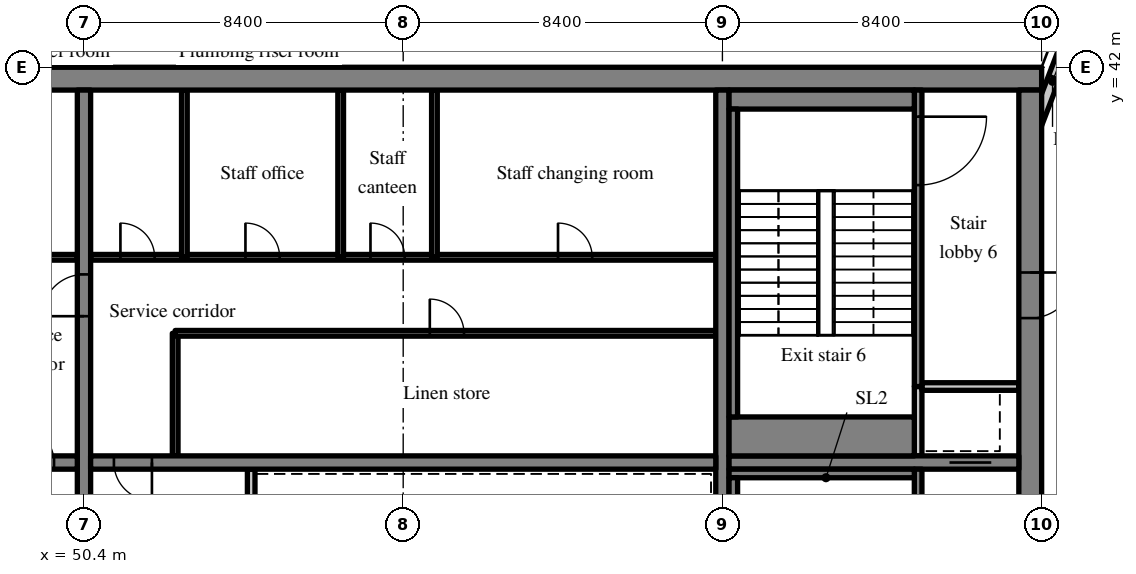
"""IFC4 building model, lengths in metres.
Left out: names, types, materials, properties, quantities, classifications, styles, units other than length and angle.
Written with IfcOpenShell. Run it as: python <this file> out.ifc"""

import sys

from ifc_helpers import new_model, si_unit, direction, frame, frame_2d, origin, place, context, subcontext, project, spatial, rectangle, extrude, source, transform, mapped, element, fill, save


model = new_model("IFC4")
c1 = context("Model", 3, precision=1e-05, world=origin(), true_north=direction((0.0, 1.0)))
c2 = subcontext(c1, "Body", "Model", "MODEL_VIEW")
j1 = project(units=[si_unit("LENGTHUNIT", "METRE"), si_unit("PLANEANGLEUNIT", "RADIAN")], contexts=[c1])
p1 = place(None, origin())
s1 = spatial("IfcSite", under=j1, at=p1, CompositionType="ELEMENT")
p2 = place(p1, origin())
s2 = spatial("IfcBuilding", under=s1, at=p2, CompositionType="ELEMENT")
p3 = place(p2, frame((0.0, 0.0, 225.7)))
s3 = spatial("IfcBuildingStorey", under=s2, at=p3, CompositionType="ELEMENT", Elevation=225.7)
m1 = source(origin(), c2, "Body", "SweptSolid", [
    extrude(rectangle(XDim=50.4, YDim=0.6, at=frame_2d((25.2, 0.0))), origin(), (0.0, 0.0, 1.0), 3.62),
])
p4 = place(p3, frame((25.2, 41.7, 0.0), z_axis=(0.0, 0.0, 1.0), x_axis=(1.0, 0.0, 0.0)))
e1 = element("IfcWall", 1, at=p4, inside=s3, PredefinedType="SHEAR", context=c2, shape_type="MappedRepresentation", body=[
    mapped(m1, transform((0.0, 0.0, 0.0), scale=1.0)),
])
m2 = source(origin(), c2, "Body", "SweptSolid", [
    extrude(rectangle(XDim=18.8, YDim=0.6, at=frame_2d((9.4, 0.0))), origin(), (0.0, 0.0, 1.0), 3.62),
])
p5 = place(p3, frame((75.3, 22.6, 0.0), z_axis=(0.0, 0.0, 1.0), x_axis=(0.0, 1.0, 0.0)))
e2 = element("IfcWall", 2, at=p5, inside=s3, PredefinedType="SHEAR", context=c2, shape_type="MappedRepresentation", body=[
    mapped(m2, transform((0.0, 0.0, 0.0), scale=1.0)),
])
m3 = source(origin(), c2, "Body", "SweptSolid", [
    extrude(rectangle(XDim=1.2, YDim=2.1, at=frame_2d((0.6, 1.05))), frame((0.0, 0.31, 0.0), z_axis=(0.0, -1.0, 0.0), x_axis=(1.0, 0.0, 0.0)), (0.0, 0.0, 1.0), 0.62),
])
p6 = place(p5, frame((12.8, 0.0, 0.0)))
e3 = element("IfcOpeningElement", 3, at=p6, cuts=e2, PredefinedType="OPENING", context=c2, shape_type="MappedRepresentation", body=[
    mapped(m3, transform((0.0, 0.0, 0.0), scale=1.0)),
])
m4 = source(origin(), c2, "Body", "SweptSolid", [
    extrude(rectangle(XDim=18.8, YDim=0.35, at=frame_2d((9.4, 0.0))), origin(), (0.0, 0.0, 1.0), 3.62),
])
p7 = place(p3, frame((50.4, 22.6, 0.0), z_axis=(0.0, 0.0, 1.0), x_axis=(0.0, 1.0, 0.0)))
e4 = element("IfcWall", 4, at=p7, inside=s3, PredefinedType="SHEAR", context=c2, shape_type="MappedRepresentation", body=[
    mapped(m4, transform((0.0, 0.0, 0.0), scale=1.0)),
])
m5 = source(origin(), c2, "Body", "SweptSolid", [
    extrude(rectangle(XDim=1.1, YDim=2.1, at=frame_2d((0.55, 1.05))), frame((0.0, 0.185, 0.0), z_axis=(0.0, -1.0, 0.0), x_axis=(1.0, 0.0, 0.0)), (0.0, 0.0, 1.0), 0.37),
])
p8 = place(p7, frame((12.85, 0.0, 0.0)))
e5 = element("IfcOpeningElement", 5, at=p8, cuts=e4, PredefinedType="OPENING", context=c2, shape_type="MappedRepresentation", body=[
    mapped(m5, transform((0.0, 0.0, 0.0), scale=1.0)),
])
p9 = place(p3, frame((67.2, 22.6, 0.0), z_axis=(0.0, 0.0, 1.0), x_axis=(0.0, 1.0, 0.0)))
e6 = element("IfcWall", 6, at=p9, inside=s3, PredefinedType="SHEAR", context=c2, shape_type="MappedRepresentation", body=[
    mapped(m4, transform((0.0, 0.0, 0.0), scale=1.0)),
])
m6 = source(origin(), c2, "Body", "SweptSolid", [
    extrude(rectangle(XDim=16.45, YDim=0.35, at=frame_2d((8.225, 0.0))), origin(), (0.0, 0.0, 1.0), 3.62),
])
p10 = place(p3, frame((33.775, 31.6, 0.0), z_axis=(0.0, 0.0, 1.0), x_axis=(1.0, 0.0, 0.0)))
e7 = element("IfcWall", 7, at=p10, inside=s3, PredefinedType="SHEAR", context=c2, shape_type="MappedRepresentation", body=[
    mapped(m6, transform((0.0, 0.0, 0.0), scale=1.0)),
])
m7 = source(origin(), c2, "Body", "SweptSolid", [
    extrude(rectangle(XDim=1.0, YDim=2.1, at=frame_2d((0.5, 1.05))), frame((0.0, 0.185, 0.0), z_axis=(0.0, -1.0, 0.0), x_axis=(1.0, 0.0, 0.0)), (0.0, 0.0, 1.0), 0.37),
])
p11 = place(p10, frame((14.837, 0.0, 0.0)))
e8 = element("IfcOpeningElement", 8, at=p11, cuts=e7, PredefinedType="OPENING", context=c2, shape_type="MappedRepresentation", body=[
    mapped(m7, transform((0.0, 0.0, 0.0), scale=1.0)),
])
m8 = source(origin(), c2, "Body", "SweptSolid", [
    extrude(rectangle(XDim=16.45, YDim=0.35, at=frame_2d((8.225, 0.0))), origin(), (0.0, 0.0, 1.0), 3.62),
])
p12 = place(p3, frame((50.575, 31.6, 0.0), z_axis=(0.0, 0.0, 1.0), x_axis=(1.0, 0.0, 0.0)))
e9 = element("IfcWall", 9, at=p12, inside=s3, PredefinedType="SHEAR", context=c2, shape_type="MappedRepresentation", body=[
    mapped(m8, transform((0.0, 0.0, 0.0), scale=1.0)),
])
p13 = place(p12, frame((0.613, 0.0, 0.0)))
e10 = element("IfcOpeningElement", 10, at=p13, cuts=e9, PredefinedType="OPENING", context=c2, shape_type="MappedRepresentation", body=[
    mapped(m7, transform((0.0, 0.0, 0.0), scale=1.0)),
])
m9 = source(origin(), c2, "Body", "SweptSolid", [
    extrude(rectangle(XDim=7.625, YDim=0.35, at=frame_2d((3.812, 0.0))), origin(), (0.0, 0.0, 1.0), 3.62),
])
p14 = place(p3, frame((67.375, 31.6, 0.0), z_axis=(0.0, 0.0, 1.0), x_axis=(1.0, 0.0, 0.0)))
e11 = element("IfcWall", 11, at=p14, inside=s3, PredefinedType="SHEAR", context=c2, shape_type="MappedRepresentation", body=[
    mapped(m9, transform((0.0, 0.0, 0.0), scale=1.0)),
])
p15 = place(p14, frame((5.8, 0.0, 0.0)))
e12 = element("IfcOpeningElement", 12, at=p15, cuts=e11, PredefinedType="OPENING", context=c2, shape_type="MappedRepresentation", body=[
    mapped(m5, transform((0.0, 0.0, 0.0), scale=1.0)),
])
m10 = source(origin(), c2, "Body", "SweptSolid", [
    extrude(rectangle(XDim=3.559, YDim=0.3, at=frame_2d((1.78, 0.0))), origin(), (0.0, 0.0, 1.0), 3.62),
])
p16 = place(p3, frame((76.523, 43.292, 0.0), z_axis=(0.0, 0.0, 1.0), x_axis=(-0.35779745313, -0.933799219604, 0.0)))
e13 = element("IfcWall", 13, at=p16, inside=s3, PredefinedType="SOLIDWALL", context=c2, shape_type="MappedRepresentation", body=[
    mapped(m10, transform((0.0, 0.0, 0.0), scale=1.0)),
])
m11 = source(origin(), c2, "Body", "SweptSolid", [
    extrude(rectangle(XDim=1.5, YDim=2.0, at=frame_2d((0.75, 1.0))), frame((0.0, 0.16, 0.0), z_axis=(0.0, -1.0, 0.0), x_axis=(1.0, 0.0, 0.0)), (0.0, 0.0, 1.0), 0.32),
])
p17 = place(p16, frame((0.156, 0.0, 0.9)))
e14 = element("IfcOpeningElement", 14, at=p17, cuts=e13, PredefinedType="OPENING", context=c2, shape_type="MappedRepresentation", body=[
    mapped(m11, transform((0.0, 0.0, 0.0), scale=1.0)),
])
m12 = source(origin(), c2, "Body", "SweptSolid", [
    extrude(rectangle(XDim=16.45, YDim=0.15, at=frame_2d((8.225, 0.0))), origin(), (0.0, 0.0, 1.0), 3.62),
])
p18 = place(p3, frame((33.775, 37.0, 0.0), z_axis=(0.0, 0.0, 1.0), x_axis=(1.0, 0.0, 0.0)))
e15 = element("IfcWall", 15, at=p18, inside=s3, PredefinedType="PARTITIONING", context=c2, shape_type="MappedRepresentation", body=[
    mapped(m12, transform((0.0, 0.0, 0.0), scale=1.0)),
])
m13 = source(origin(), c2, "Body", "SweptSolid", [
    extrude(rectangle(XDim=0.9, YDim=2.1, at=frame_2d((0.45, 1.05))), frame((0.0, 0.085, 0.0), z_axis=(0.0, -1.0, 0.0), x_axis=(1.0, 0.0, 0.0)), (0.0, 0.0, 1.0), 0.17),
])
p19 = place(p18, frame((1.606, 0.0, 0.0)))
e16 = element("IfcOpeningElement", 16, at=p19, cuts=e15, PredefinedType="OPENING", context=c2, shape_type="MappedRepresentation", body=[
    mapped(m13, transform((0.0, 0.0, 0.0), scale=1.0)),
])
p20 = place(p18, frame((7.364, 0.0, 0.0)))
e17 = element("IfcOpeningElement", 17, at=p20, cuts=e15, PredefinedType="OPENING", context=c2, shape_type="MappedRepresentation", body=[
    mapped(m13, transform((0.0, 0.0, 0.0), scale=1.0)),
])
p21 = place(p18, frame((12.299, 0.0, 0.0)))
e18 = element("IfcOpeningElement", 18, at=p21, cuts=e15, PredefinedType="OPENING", context=c2, shape_type="MappedRepresentation", body=[
    mapped(m13, transform((0.0, 0.0, 0.0), scale=1.0)),
])
p22 = place(p18, frame((14.766, 0.0, 0.0)))
e19 = element("IfcOpeningElement", 19, at=p22, cuts=e15, PredefinedType="OPENING", context=c2, shape_type="MappedRepresentation", body=[
    mapped(m13, transform((0.0, 0.0, 0.0), scale=1.0)),
])
m14 = source(origin(), c2, "Body", "SweptSolid", [
    extrude(rectangle(XDim=2.625, YDim=0.2, at=frame_2d((1.312, 0.0))), origin(), (0.0, 0.0, 1.0), 3.62),
])
p23 = place(p3, frame((54.8, 28.8, 0.0), z_axis=(0.0, 0.0, 1.0), x_axis=(0.0, 1.0, 0.0)))
e20 = element("IfcWall", 20, at=p23, inside=s3, PredefinedType="SOLIDWALL", context=c2, shape_type="MappedRepresentation", body=[
    mapped(m14, transform((0.0, 0.0, 0.0), scale=1.0)),
])
m15 = source(origin(), c2, "Body", "SweptSolid", [
    extrude(rectangle(XDim=3.225, YDim=0.15, at=frame_2d((1.613, 0.0))), origin(), (0.0, 0.0, 1.0), 3.62),
])
p24 = place(p3, frame((52.8, 31.775, 0.0), z_axis=(0.0, 0.0, 1.0), x_axis=(0.0, 1.0, 0.0)))
e21 = element("IfcWall", 21, at=p24, inside=s3, PredefinedType="PARTITIONING", context=c2, shape_type="MappedRepresentation", body=[
    mapped(m15, transform((0.0, 0.0, 0.0), scale=1.0)),
])
m16 = source(origin(), c2, "Body", "SweptSolid", [
    extrude(rectangle(XDim=14.225, YDim=0.15, at=frame_2d((7.112, 0.0))), origin(), (0.0, 0.0, 1.0), 3.62),
])
p25 = place(p3, frame((67.025, 35.0, 0.0), z_axis=(0.0, 0.0, 1.0), x_axis=(-1.0, 0.0, 0.0)))
e22 = element("IfcWall", 22, at=p25, inside=s3, PredefinedType="PARTITIONING", context=c2, shape_type="MappedRepresentation", body=[
    mapped(m16, transform((0.0, 0.0, 0.0), scale=1.0)),
])
p26 = place(p25, frame((6.625, 0.0, 0.0)))
e23 = element("IfcOpeningElement", 23, at=p26, cuts=e22, PredefinedType="OPENING", context=c2, shape_type="MappedRepresentation", body=[
    mapped(m13, transform((0.0, 0.0, 0.0), scale=1.0)),
])
m17 = source(origin(), c2, "Body", "SweptSolid", [
    extrude(rectangle(XDim=16.45, YDim=0.15, at=frame_2d((8.225, 0.0))), origin(), (0.0, 0.0, 1.0), 3.62),
])
p27 = place(p3, frame((67.025, 37.0, 0.0), z_axis=(0.0, 0.0, 1.0), x_axis=(-1.0, 0.0, 0.0)))
e24 = element("IfcWall", 24, at=p27, inside=s3, PredefinedType="PARTITIONING", context=c2, shape_type="MappedRepresentation", body=[
    mapped(m17, transform((0.0, 0.0, 0.0), scale=1.0)),
])
p28 = place(p27, frame((3.251, 0.0, 0.0)))
e25 = element("IfcOpeningElement", 25, at=p28, cuts=e24, PredefinedType="OPENING", context=c2, shape_type="MappedRepresentation", body=[
    mapped(m13, transform((0.0, 0.0, 0.0), scale=1.0)),
])
p29 = place(p27, frame((8.186, 0.0, 0.0)))
e26 = element("IfcOpeningElement", 26, at=p29, cuts=e24, PredefinedType="OPENING", context=c2, shape_type="MappedRepresentation", body=[
    mapped(m13, transform((0.0, 0.0, 0.0), scale=1.0)),
])
p30 = place(p27, frame((11.476, 0.0, 0.0)))
e27 = element("IfcOpeningElement", 27, at=p30, cuts=e24, PredefinedType="OPENING", context=c2, shape_type="MappedRepresentation", body=[
    mapped(m13, transform((0.0, 0.0, 0.0), scale=1.0)),
])
p31 = place(p27, frame((14.766, 0.0, 0.0)))
e28 = element("IfcOpeningElement", 28, at=p31, cuts=e24, PredefinedType="OPENING", context=c2, shape_type="MappedRepresentation", body=[
    mapped(m13, transform((0.0, 0.0, 0.0), scale=1.0)),
])
m18 = source(origin(), c2, "Body", "SweptSolid", [
    extrude(rectangle(XDim=4.4, YDim=0.15, at=frame_2d((2.2, 0.0))), origin(), (0.0, 0.0, 1.0), 3.62),
])
for number, where, z_axis, x_axis in (
    (29, (59.622, 37.0, 0.0), (0.0, 0.0, 1.0), (0.0, 1.0, 0.0)),
    (30, (57.155, 37.0, 0.0), (0.0, 0.0, 1.0), (0.0, 1.0, 0.0)),
    (31, (53.042, 37.0, 0.0), (0.0, 0.0, 1.0), (0.0, 1.0, 0.0)),
):
    element("IfcWall", number, at=place(p3, frame(where, z_axis=z_axis, x_axis=x_axis)), inside=s3, PredefinedType="PARTITIONING", context=c2, shape_type="MappedRepresentation", body=[
        mapped(m18, transform((0.0, 0.0, 0.0), scale=1.0)),
    ])
m19 = source(origin(), c2, "Body", "SweptSolid", [
    extrude(rectangle(XDim=8.825, YDim=0.2, at=frame_2d((4.413, 0.0))), origin(), (0.0, 0.0, 1.0), 3.62),
])
p32 = place(p3, frame((72.35, 22.6, 0.0), z_axis=(0.0, 0.0, 1.0), x_axis=(0.0, 1.0, 0.0)))
e32 = element("IfcWall", 32, at=p32, inside=s3, PredefinedType="SOLIDWALL", context=c2, shape_type="MappedRepresentation", body=[
    mapped(m19, transform((0.0, 0.0, 0.0), scale=1.0)),
])
m20 = source(origin(), c2, "Body", "SweptSolid", [
    extrude(rectangle(XDim=1.2, YDim=2.1, at=frame_2d((0.6, 1.05))), frame((0.0, 0.11, 0.0), z_axis=(0.0, -1.0, 0.0), x_axis=(1.0, 0.0, 0.0)), (0.0, 0.0, 1.0), 0.22),
])
p33 = place(p32, frame((6.9, 0.0, 0.0)))
e33 = element("IfcOpeningElement", 33, at=p33, cuts=e32, PredefinedType="OPENING", context=c2, shape_type="MappedRepresentation", body=[
    mapped(m20, transform((0.0, 0.0, 0.0), scale=1.0)),
])
m21 = source(origin(), c2, "Body", "SweptSolid", [
    extrude(rectangle(XDim=1.825, YDim=0.2, at=frame_2d((0.913, 0.0))), origin(), (0.0, 0.0, 1.0), 3.62),
])
p34 = place(p3, frame((72.35, 31.775, 0.0), z_axis=(0.0, 0.0, 1.0), x_axis=(0.0, 1.0, 0.0)))
e34 = element("IfcWall", 34, at=p34, inside=s3, PredefinedType="SOLIDWALL", context=c2, shape_type="MappedRepresentation", body=[
    mapped(m21, transform((0.0, 0.0, 0.0), scale=1.0)),
])
m22 = source(origin(), c2, "Body", "SweptSolid", [
    extrude(rectangle(XDim=2.55, YDim=0.2, at=frame_2d((1.275, 0.0))), origin(), (0.0, 0.0, 1.0), 3.62),
])
p35 = place(p3, frame((72.45, 33.6, 0.0), z_axis=(0.0, 0.0, 1.0), x_axis=(1.0, 0.0, 0.0)))
e35 = element("IfcWall", 35, at=p35, inside=s3, PredefinedType="SOLIDWALL", context=c2, shape_type="MappedRepresentation", body=[
    mapped(m22, transform((0.0, 0.0, 0.0), scale=1.0)),
])
m23 = source(origin(), c2, "Body", "SweptSolid", [
    extrude(rectangle(XDim=7.8, YDim=0.2, at=frame_2d((3.9, 0.0))), origin(), (0.0, 0.0, 1.0), 3.62),
])
p36 = place(p3, frame((72.35, 33.6, 0.0), z_axis=(0.0, 0.0, 1.0), x_axis=(0.0, 1.0, 0.0)))
e36 = element("IfcWall", 36, at=p36, inside=s3, PredefinedType="SOLIDWALL", context=c2, shape_type="MappedRepresentation", body=[
    mapped(m23, transform((0.0, 0.0, 0.0), scale=1.0)),
])
m24 = source(origin(), c2, "Body", "SweptSolid", [
    extrude(rectangle(XDim=1.8, YDim=2.1, at=frame_2d((0.9, 1.05))), frame((0.0, 0.11, 0.0), z_axis=(0.0, -1.0, 0.0), x_axis=(1.0, 0.0, 0.0)), (0.0, 0.0, 1.0), 0.22),
])
p37 = place(p36, frame((5.3, 0.0, 0.0)))
e37 = element("IfcOpeningElement", 37, at=p37, cuts=e36, PredefinedType="OPENING", context=c2, shape_type="MappedRepresentation", body=[
    mapped(m24, transform((0.0, 0.0, 0.0), scale=1.0)),
])
m25 = source(origin(), c2, "Body", "SweptSolid", [
    extrude(rectangle(XDim=4.875, YDim=0.225, at=frame_2d((2.438, 0.0))), origin(), (0.0, 0.0, 1.0), 3.62),
])
p38 = place(p3, frame((67.375, 31.312, 0.0), z_axis=(0.0, 0.0, 1.0), x_axis=(1.0, 0.0, 0.0)))
e38 = element("IfcWall", 38, at=p38, inside=s3, PredefinedType="SOLIDWALL", context=c2, shape_type="MappedRepresentation", body=[
    mapped(m25, transform((0.0, 0.0, 0.0), scale=1.0)),
])
m26 = source(origin(), c2, "Body", "SweptSolid", [
    extrude(rectangle(XDim=8.1, YDim=0.225, at=frame_2d((4.05, 0.0))), origin(), (0.0, 0.0, 1.0), 3.62),
])
p39 = place(p3, frame((67.487, 23.1, 0.0), z_axis=(0.0, 0.0, 1.0), x_axis=(0.0, 1.0, 0.0)))
e39 = element("IfcWall", 39, at=p39, inside=s3, PredefinedType="SOLIDWALL", context=c2, shape_type="MappedRepresentation", body=[
    mapped(m26, transform((0.0, 0.0, 0.0), scale=1.0)),
])
m27 = source(origin(), c2, "Body", "SweptSolid", [
    extrude(rectangle(XDim=4.875, YDim=0.5, at=frame_2d((2.438, 0.0))), origin(), (0.0, 0.0, 1.0), 3.62),
])
p40 = place(p3, frame((67.375, 41.15, 0.0), z_axis=(0.0, 0.0, 1.0), x_axis=(1.0, 0.0, 0.0)))
e40 = element("IfcWall", 40, at=p40, inside=s3, PredefinedType="SOLIDWALL", context=c2, shape_type="MappedRepresentation", body=[
    mapped(m27, transform((0.0, 0.0, 0.0), scale=1.0)),
])
m28 = source(origin(), c2, "Body", "SweptSolid", [
    extrude(rectangle(XDim=4.875, YDim=1.025, at=frame_2d((2.438, 0.0))), origin(), (0.0, 0.0, 1.0), 3.62),
])
p41 = place(p3, frame((67.375, 32.287, 0.0), z_axis=(0.0, 0.0, 1.0), x_axis=(1.0, 0.0, 0.0)))
e41 = element("IfcWall", 41, at=p41, inside=s3, PredefinedType="SOLIDWALL", context=c2, shape_type="MappedRepresentation", body=[
    mapped(m28, transform((0.0, 0.0, 0.0), scale=1.0)),
])
p42 = place(p3, frame((67.487, 32.8, 0.0), z_axis=(0.0, 0.0, 1.0), x_axis=(0.0, 1.0, 0.0)))
e42 = element("IfcWall", 42, at=p42, inside=s3, PredefinedType="SOLIDWALL", context=c2, shape_type="MappedRepresentation", body=[
    mapped(m26, transform((0.0, 0.0, 0.0), scale=1.0)),
])
m29 = source(origin(), c2, "Body", "SweptSolid", [
    extrude(rectangle(XDim=1.5, YDim=2.0, at=frame_2d((0.75, 1.0))), frame((0.0, 0.03, 0.0), z_axis=(0.0, -1.0, 0.0), x_axis=(1.0, 0.0, 0.0)), (0.0, 0.0, 1.0), 0.06),
])
p43 = place(p17, origin())
e43 = element("IfcWindow", 43, at=p43, inside=s3, PartitioningType="SINGLE_PANEL", PredefinedType="WINDOW", context=c2, shape_type="MappedRepresentation", body=[
    mapped(m29, transform((0.0, 0.0, 0.0), scale=1.0)),
])
fill(e14, e43)
m30 = source(origin(), c2, "Body", "SweptSolid", [
    extrude(rectangle(XDim=1.0, YDim=2.1, at=frame_2d((0.5, 1.05))), frame((0.0, 0.025, 0.0), z_axis=(0.0, -1.0, 0.0), x_axis=(1.0, 0.0, 0.0)), (0.0, 0.0, 1.0), 0.05),
])
p44 = place(p11, origin())
e44 = element("IfcDoor", 44, at=p44, inside=s3, OperationType="SINGLE_SWING_LEFT", PredefinedType="DOOR", context=c2, shape_type="MappedRepresentation", body=[
    mapped(m30, transform((0.0, 0.0, 0.0), scale=1.0)),
])
fill(e8, e44)
p45 = place(p13, origin())
e45 = element("IfcDoor", 45, at=p45, inside=s3, OperationType="SINGLE_SWING_RIGHT", PredefinedType="DOOR", context=c2, shape_type="MappedRepresentation", body=[
    mapped(m30, transform((0.0, 0.0, 0.0), scale=1.0)),
])
fill(e10, e45)
m31 = source(origin(), c2, "Body", "SweptSolid", [
    extrude(rectangle(XDim=0.9, YDim=2.1, at=frame_2d((0.45, 1.05))), frame((0.0, 0.025, 0.0), z_axis=(0.0, -1.0, 0.0), x_axis=(1.0, 0.0, 0.0)), (0.0, 0.0, 1.0), 0.05),
])
p46 = place(p26, origin())
e46 = element("IfcDoor", 46, at=p46, inside=s3, OperationType="SINGLE_SWING_RIGHT", PredefinedType="DOOR", context=c2, shape_type="MappedRepresentation", body=[
    mapped(m31, transform((0.0, 0.0, 0.0), scale=1.0)),
])
fill(e23, e46)
p47 = place(p28, origin())
e47 = element("IfcDoor", 47, at=p47, inside=s3, OperationType="SINGLE_SWING_RIGHT", PredefinedType="DOOR", context=c2, shape_type="MappedRepresentation", body=[
    mapped(m31, transform((0.0, 0.0, 0.0), scale=1.0)),
])
fill(e25, e47)
p48 = place(p29, origin())
e48 = element("IfcDoor", 48, at=p48, inside=s3, OperationType="SINGLE_SWING_RIGHT", PredefinedType="DOOR", context=c2, shape_type="MappedRepresentation", body=[
    mapped(m31, transform((0.0, 0.0, 0.0), scale=1.0)),
])
fill(e26, e48)
p49 = place(p30, origin())
e49 = element("IfcDoor", 49, at=p49, inside=s3, OperationType="SINGLE_SWING_RIGHT", PredefinedType="DOOR", context=c2, shape_type="MappedRepresentation", body=[
    mapped(m31, transform((0.0, 0.0, 0.0), scale=1.0)),
])
fill(e27, e49)
p50 = place(p31, origin())
e50 = element("IfcDoor", 50, at=p50, inside=s3, OperationType="SINGLE_SWING_RIGHT", PredefinedType="DOOR", context=c2, shape_type="MappedRepresentation", body=[
    mapped(m31, transform((0.0, 0.0, 0.0), scale=1.0)),
])
fill(e28, e50)
m32 = source(origin(), c2, "Body", "SweptSolid", [
    extrude(rectangle(XDim=1.1, YDim=2.1, at=frame_2d((0.55, 1.05))), frame((0.0, 0.025, 0.0), z_axis=(0.0, -1.0, 0.0), x_axis=(1.0, 0.0, 0.0)), (0.0, 0.0, 1.0), 0.05),
])
p51 = place(p15, origin())
e51 = element("IfcDoor", 51, at=p51, inside=s3, OperationType="SLIDING_TO_LEFT", PredefinedType="DOOR", context=c2, shape_type="MappedRepresentation", body=[
    mapped(m32, transform((0.0, 0.0, 0.0), scale=1.0)),
])
fill(e12, e51)
m33 = source(origin(), c2, "Body", "SweptSolid", [
    extrude(rectangle(XDim=1.8, YDim=2.1, at=frame_2d((0.9, 1.05))), frame((0.0, 0.025, 0.0), z_axis=(0.0, -1.0, 0.0), x_axis=(1.0, 0.0, 0.0)), (0.0, 0.0, 1.0), 0.05),
])
p52 = place(p37, origin())
e52 = element("IfcDoor", 52, at=p52, inside=s3, OperationType="SINGLE_SWING_RIGHT", PredefinedType="DOOR", context=c2, shape_type="MappedRepresentation", body=[
    mapped(m33, transform((0.0, 0.0, 0.0), scale=1.0)),
])
fill(e37, e52)
m34 = source(origin(), c2, "Body", "SweptSolid", [
    extrude(rectangle(XDim=1.2, YDim=2.1, at=frame_2d((0.6, 1.05))), frame((0.0, 0.025, 0.0), z_axis=(0.0, -1.0, 0.0), x_axis=(1.0, 0.0, 0.0)), (0.0, 0.0, 1.0), 0.05),
])
p53 = place(p6, origin())
e53 = element("IfcDoor", 53, at=p53, inside=s3, OperationType="SINGLE_SWING_RIGHT", PredefinedType="DOOR", context=c2, shape_type="MappedRepresentation", body=[
    mapped(m34, transform((0.0, 0.0, 0.0), scale=1.0)),
])
fill(e3, e53)
p54 = place(p8, origin())
e54 = element("IfcDoor", 54, at=p54, inside=s3, OperationType="SINGLE_SWING_LEFT", PredefinedType="DOOR", context=c2, shape_type="MappedRepresentation", body=[
    mapped(m32, transform((0.0, 0.0, 0.0), scale=1.0)),
])
fill(e5, e54)
save(model, sys.argv[1])
